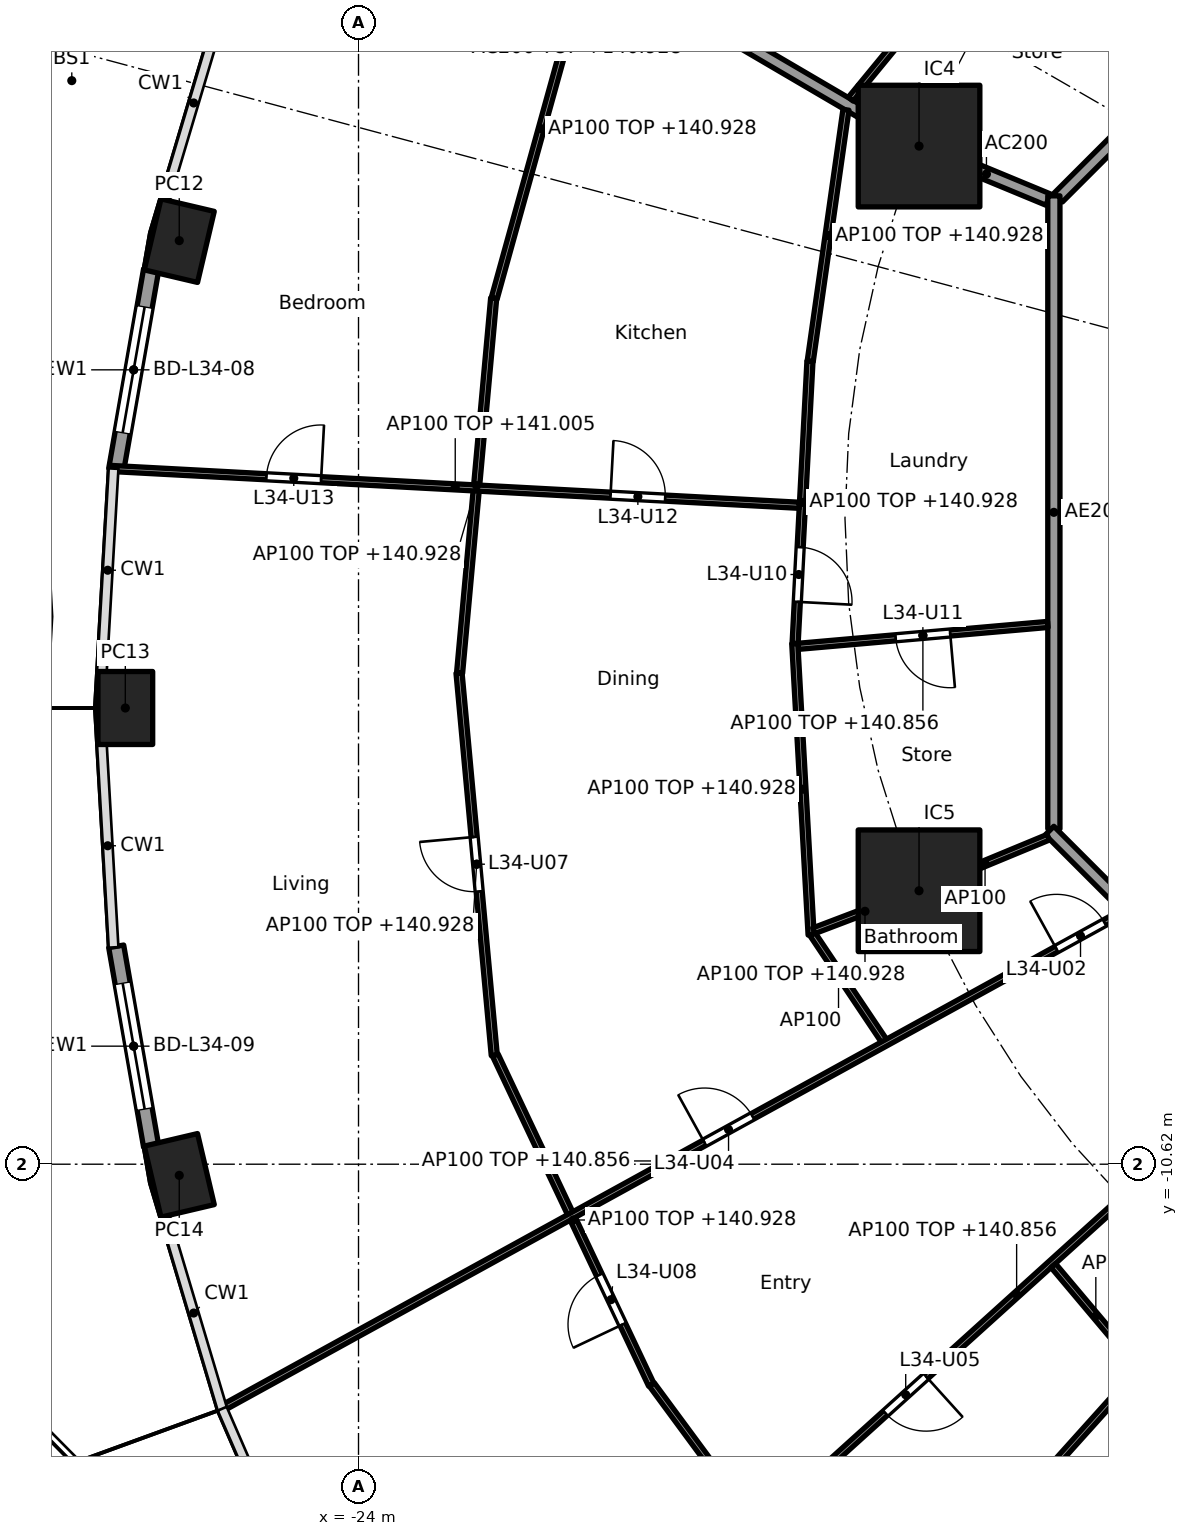
"""IFC4 building model, lengths in metres.
Left out: names, types, materials, properties, quantities, classifications, styles, units other than length and angle.
Written with IfcOpenShell. Run it as: python <this file> out.ifc"""

import sys

from ifc_helpers import new_model, si_unit, direction, frame, frame_2d, origin, origin_2d, place, context, subcontext, project, spatial, rectangle, hollow_rectangle, extrude, element, fill, save


model = new_model("IFC4")
c1 = context("Model", 3, precision=1e-05, world=origin(), true_north=direction((0.0, 1.0)))
c2 = subcontext(c1, "Body", "Model", "MODEL_VIEW")
j1 = project(units=[si_unit("LENGTHUNIT", "METRE"), si_unit("PLANEANGLEUNIT", "RADIAN")], contexts=[c1])
p1 = place(None, origin())
s1 = spatial("IfcSite", under=j1, at=p1, CompositionType="ELEMENT")
p2 = place(p1, origin())
s2 = spatial("IfcBuilding", under=s1, at=p2, CompositionType="ELEMENT")
p3 = place(p2, frame((0.0, 0.0, 138.1)))
s3 = spatial("IfcBuildingStorey", under=s2, at=p3, CompositionType="ELEMENT", Elevation=138.1)
for number, where, z_axis, x_axis in (
    (1, (-26.948, 4.568, 0.0), (0.0, 0.0, 1.0), (-0.229, -0.973, 0.0)),
    (2, (-27.835, -3.118, 0.0), (0.0, 0.0, 1.0), (0.0, -1.0, 0.0)),
    (3, (-26.948, -10.803, 0.0), (0.0, 0.0, 1.0), (0.229, -0.973, 0.0)),
):
    element("IfcColumn", number, at=place(p3, frame(where, z_axis=z_axis, x_axis=x_axis)), inside=s3, PredefinedType="COLUMN", context=c2, shape_type="SweptSolid", body=[
        extrude(hollow_rectangle(XDim=1.2, YDim=0.9, WallThickness=0.04, at=origin_2d()), origin(), (0.0, 0.0, 1.0), 3.7),
    ])
for number, where, z_axis, x_axis in (
    (4, (-14.782, 6.123, 0.0), (0.0, 0.0, 1.0), (1.0, 0.0, 0.0)),
    (5, (-14.782, -6.123, 0.0), (0.0, 0.0, 1.0), (1.0, 0.0, 0.0)),
):
    element("IfcColumn", number, at=place(p3, frame(where, z_axis=z_axis, x_axis=x_axis)), inside=s3, PredefinedType="COLUMN", context=c2, shape_type="SweptSolid", body=[
        extrude(rectangle(XDim=2.0, YDim=2.0, at=origin_2d()), origin(), (0.0, 0.0, 1.0), 3.7),
    ])
p4 = place(p3, frame((-27.985, 0.802, 0.0), z_axis=(0.0, 0.0, 1.0), x_axis=(0.172163521006, 0.985068384446, 0.0)))
e6 = element("IfcWall", 6, at=p4, inside=s3, PredefinedType="SOLIDWALL", context=c2, shape_type="SweptSolid", body=[
    extrude(rectangle(XDim=3.333, YDim=0.25, at=frame_2d((1.666, 0.0))), origin(), (0.0, 0.0, 1.0), 3.44),
])
p5 = place(p4, frame((0.616, 0.0, 0.0)))
e7 = element("IfcOpeningElement", 7, at=p5, cuts=e6, PredefinedType="OPENING", context=c2, shape_type="SweptSolid", body=[
    extrude(rectangle(XDim=2.1, YDim=2.4, at=frame_2d((1.05, 1.2))), frame((0.0, 0.135, 0.0), z_axis=(0.0, -1.0, 0.0), x_axis=(1.0, 0.0, 0.0)), (0.0, 0.0, 1.0), 0.27),
])
p6 = place(p3, frame((-27.411, -10.32, 0.0), z_axis=(0.0, 0.0, 1.0), x_axis=(-0.172163521006, 0.985068384446, 0.0)))
e8 = element("IfcWall", 8, at=p6, inside=s3, PredefinedType="SOLIDWALL", context=c2, shape_type="SweptSolid", body=[
    extrude(rectangle(XDim=3.333, YDim=0.25, at=frame_2d((1.666, 0.0))), origin(), (0.0, 0.0, 1.0), 3.44),
])
p7 = place(p6, frame((0.616, 0.0, 0.0)))
e9 = element("IfcOpeningElement", 9, at=p7, cuts=e8, PredefinedType="OPENING", context=c2, shape_type="SweptSolid", body=[
    extrude(rectangle(XDim=2.1, YDim=2.4, at=frame_2d((1.05, 1.2))), frame((0.0, 0.135, 0.0), z_axis=(0.0, -1.0, 0.0), x_axis=(1.0, 0.0, 0.0)), (0.0, 0.0, 1.0), 0.27),
])
p8 = place(p3, frame((-12.657, 5.243, 0.0), z_axis=(0.0, 0.0, 1.0), x_axis=(-0.923869415315, 0.382707856524, 0.0)))
e10 = element("IfcWall", 10, at=p8, inside=s3, PredefinedType="PARTITIONING", context=c2, shape_type="SweptSolid", body=[
    extrude(rectangle(XDim=2.2, YDim=0.2, at=frame_2d((1.1, 0.0))), origin(), (0.0, 0.0, 1.0), 3.44),
])
p9 = place(p3, frame((-14.825, 6.148, 0.0), z_axis=(0.0, 0.0, 1.0), x_axis=(-0.862852031662, 0.505456597006, 0.0)))
e11 = element("IfcWall", 11, at=p9, inside=s3, PredefinedType="PARTITIONING", context=c2, shape_type="SweptSolid", body=[
    extrude(rectangle(XDim=10.487, YDim=0.2, at=frame_2d((5.244, 0.0))), origin(), (0.0, 0.0, 1.0), 2.828),
])
p10 = place(p3, frame((-6.149, -14.825, 0.0), z_axis=(0.0, 0.0, 1.0), x_axis=(-0.525406383516, -0.85085141603, 0.0)))
e12 = element("IfcWall", 12, at=p10, inside=s3, PredefinedType="PARTITIONING", context=c2, shape_type="SweptSolid", body=[
    extrude(rectangle(XDim=15.925, YDim=0.2, at=frame_2d((7.962, 0.0))), origin(), (0.0, 0.0, 1.0), 2.828),
])
p11 = place(p3, frame((-5.275, 12.494, 0.0), z_axis=(0.0, 0.0, 1.0), x_axis=(-0.707106781187, -0.707106781187, 0.0)))
e13 = element("IfcWall", 13, at=p11, inside=s3, PredefinedType="PARTITIONING", context=c2, shape_type="SweptSolid", body=[
    extrude(rectangle(XDim=10.209, YDim=0.2, at=frame_2d((5.104, 0.0))), origin(), (0.0, 0.0, 1.0), 3.44),
])
p12 = place(p11, frame((4.604, 0.0, 0.0)))
e14 = element("IfcOpeningElement", 14, at=p12, cuts=e13, PredefinedType="OPENING", context=c2, shape_type="SweptSolid", body=[
    extrude(rectangle(XDim=1.0, YDim=2.1, at=frame_2d((0.5, 1.05))), frame((0.0, 0.11, 0.0), z_axis=(0.0, -1.0, 0.0), x_axis=(1.0, 0.0, 0.0)), (0.0, 0.0, 1.0), 0.22),
])
p13 = place(p3, frame((-12.565, 5.304, 0.0), z_axis=(0.0, 0.0, 1.0), x_axis=(0.0, -1.0, 0.0)))
e15 = element("IfcWall", 15, at=p13, inside=s3, PredefinedType="PARTITIONING", context=c2, shape_type="SweptSolid", body=[
    extrude(rectangle(XDim=10.409, YDim=0.2, at=frame_2d((5.205, 0.0))), origin(), (0.0, 0.0, 1.0), 3.44),
])
p14 = place(p3, frame((-12.635, -5.134, 0.0), z_axis=(0.0, 0.0, 1.0), x_axis=(0.707106781187, -0.707106781187, 0.0)))
e16 = element("IfcWall", 16, at=p14, inside=s3, PredefinedType="PARTITIONING", context=c2, shape_type="SweptSolid", body=[
    extrude(rectangle(XDim=10.609, YDim=0.2, at=frame_2d((5.305, 0.0))), origin(), (0.0, 0.0, 1.0), 3.44),
])
p15 = place(p14, frame((3.07, 0.0, 0.0)))
e17 = element("IfcOpeningElement", 17, at=p15, cuts=e16, PredefinedType="OPENING", context=c2, shape_type="SweptSolid", body=[
    extrude(rectangle(XDim=1.0, YDim=2.1, at=frame_2d((0.5, 1.05))), frame((0.0, 0.11, 0.0), z_axis=(0.0, -1.0, 0.0), x_axis=(1.0, 0.0, 0.0)), (0.0, 0.0, 1.0), 0.22),
])
p16 = place(p3, frame((-12.965, 10.475, 0.0), z_axis=(0.0, 0.0, 1.0), x_axis=(-0.634943961338, -0.772558195841, 0.0)))
e18 = element("IfcWall", 18, at=p16, inside=s3, PredefinedType="PARTITIONING", context=c2, shape_type="SweptSolid", body=[
    extrude(rectangle(XDim=4.632, YDim=0.1, at=frame_2d((2.316, 0.0))), origin(), (0.0, 0.0, 1.0), 2.828),
])
p17 = place(p3, frame((-15.984, 6.72, 0.0), z_axis=(0.0, 0.0, 1.0), x_axis=(-0.140684869512, -0.990054426529, 0.0)))
e19 = element("IfcWall", 19, at=p17, inside=s3, PredefinedType="PARTITIONING", context=c2, shape_type="SweptSolid", body=[
    extrude(rectangle(XDim=4.177, YDim=0.1, at=frame_2d((2.088, 0.0))), origin(), (0.0, 0.0, 1.0), 2.828),
])
p18 = place(p3, frame((-20.221, 9.197, 0.0), z_axis=(0.0, 0.0, 1.0), x_axis=(-0.267398009191, -0.963586168789, 0.0)))
e20 = element("IfcWall", 20, at=p18, inside=s3, PredefinedType="PARTITIONING", context=c2, shape_type="SweptSolid", body=[
    extrude(rectangle(XDim=5.788, YDim=0.1, at=frame_2d((2.894, 0.0))), origin(), (0.0, 0.0, 1.0), 2.828),
])
p19 = place(p3, frame((-16.576, 2.585, 0.0), z_axis=(0.0, 0.0, 1.0), x_axis=(-0.052509224895, -0.998620439056, 0.0)))
e21 = element("IfcWall", 21, at=p19, inside=s3, PredefinedType="PARTITIONING", context=c2, shape_type="SweptSolid", body=[
    extrude(rectangle(XDim=4.649, YDim=0.1, at=frame_2d((2.325, 0.0))), origin(), (0.0, 0.0, 1.0), 2.828),
])
p20 = place(p19, frame((3.062, 0.0, 0.0)))
e22 = element("IfcOpeningElement", 22, at=p20, cuts=e21, PredefinedType="OPENING", context=c2, shape_type="SweptSolid", body=[
    extrude(rectangle(XDim=0.9, YDim=2.1, at=frame_2d((0.45, 1.05))), frame((0.0, 0.06, 0.0), z_axis=(0.0, -1.0, 0.0), x_axis=(1.0, 0.0, 0.0)), (0.0, 0.0, 1.0), 0.12),
])
p21 = place(p3, frame((-21.777, 3.621, 0.0), z_axis=(0.0, 0.0, 1.0), x_axis=(-0.090606877484, -0.995886737412, 0.0)))
e23 = element("IfcWall", 23, at=p21, inside=s3, PredefinedType="PARTITIONING", context=c2, shape_type="SweptSolid", body=[
    extrude(rectangle(XDim=6.189, YDim=0.1, at=frame_2d((3.095, 0.0))), origin(), (0.0, 0.0, 1.0), 2.828),
])
p22 = place(p3, frame((-16.75, 0.216, 0.0), z_axis=(0.0, 0.0, 1.0), x_axis=(-0.998572054207, 0.053421461579, 0.0)))
e24 = element("IfcWall", 24, at=p22, inside=s3, PredefinedType="PARTITIONING", context=c2, shape_type="SweptSolid", body=[
    extrude(rectangle(XDim=11.334, YDim=0.1, at=frame_2d((5.667, 0.0))), origin(), (0.0, 0.0, 1.0), 2.905),
])
p23 = place(p22, frame((2.209, 0.0, 0.0)))
e25 = element("IfcOpeningElement", 25, at=p23, cuts=e24, PredefinedType="OPENING", context=c2, shape_type="SweptSolid", body=[
    extrude(rectangle(XDim=0.9, YDim=2.1, at=frame_2d((0.45, 1.05))), frame((0.0, 0.06, 0.0), z_axis=(0.0, -1.0, 0.0), x_axis=(1.0, 0.0, 0.0)), (0.0, 0.0, 1.0), 0.12),
])
p24 = place(p22, frame((7.876, 0.0, 0.0)))
e26 = element("IfcOpeningElement", 26, at=p24, cuts=e24, PredefinedType="OPENING", context=c2, shape_type="SweptSolid", body=[
    extrude(rectangle(XDim=0.9, YDim=2.1, at=frame_2d((0.45, 1.05))), frame((0.0, 0.06, 0.0), z_axis=(0.0, -1.0, 0.0), x_axis=(1.0, 0.0, 0.0)), (0.0, 0.0, 1.0), 0.12),
])
p25 = place(p3, frame((-12.664, -1.744, 0.0), z_axis=(0.0, 0.0, 1.0), x_axis=(-0.996181049379, -0.08731160781, 0.0)))
e27 = element("IfcWall", 27, at=p25, inside=s3, PredefinedType="PARTITIONING", context=c2, shape_type="SweptSolid", body=[
    extrude(rectangle(XDim=4.125, YDim=0.1, at=frame_2d((2.062, 0.0))), origin(), (0.0, 0.0, 1.0), 2.756),
])
p26 = place(p25, frame((1.612, 0.0, 0.0)))
e28 = element("IfcOpeningElement", 28, at=p26, cuts=e27, PredefinedType="OPENING", context=c2, shape_type="SweptSolid", body=[
    extrude(rectangle(XDim=0.9, YDim=2.1, at=frame_2d((0.45, 1.05))), frame((0.0, 0.06, 0.0), z_axis=(0.0, -1.0, 0.0), x_axis=(1.0, 0.0, 0.0)), (0.0, 0.0, 1.0), 0.12),
])
p27 = place(p3, frame((-16.825, -2.058, 0.0), z_axis=(0.0, 0.0, 1.0), x_axis=(0.055971643802, -0.998432358796, 0.0)))
e29 = element("IfcWall", 29, at=p27, inside=s3, PredefinedType="PARTITIONING", context=c2, shape_type="SweptSolid", body=[
    extrude(rectangle(XDim=4.798, YDim=0.1, at=frame_2d((2.399, 0.0))), origin(), (0.0, 0.0, 1.0), 2.828),
])
p28 = place(p3, frame((-22.347, -2.542, 0.0), z_axis=(0.0, 0.0, 1.0), x_axis=(0.091783634244, -0.995778973711, 0.0)))
e30 = element("IfcWall", 30, at=p28, inside=s3, PredefinedType="PARTITIONING", context=c2, shape_type="SweptSolid", body=[
    extrude(rectangle(XDim=6.315, YDim=0.1, at=frame_2d((3.157, 0.0))), origin(), (0.0, 0.0, 1.0), 2.828),
])
p29 = place(p28, frame((2.708, 0.0, 0.0)))
e31 = element("IfcOpeningElement", 31, at=p29, cuts=e30, PredefinedType="OPENING", context=c2, shape_type="SweptSolid", body=[
    extrude(rectangle(XDim=0.9, YDim=2.1, at=frame_2d((0.45, 1.05))), frame((0.0, 0.06, 0.0), z_axis=(0.0, -1.0, 0.0), x_axis=(1.0, 0.0, 0.0)), (0.0, 0.0, 1.0), 0.12),
])
p30 = place(p3, frame((-12.657, -5.243, 0.0), z_axis=(0.0, 0.0, 1.0), x_axis=(-0.923864733477, -0.382719158442, 0.0)))
e32 = element("IfcWall", 32, at=p30, inside=s3, PredefinedType="PARTITIONING", context=c2, shape_type="SweptSolid", body=[
    extrude(rectangle(XDim=2.25, YDim=0.1, at=frame_2d((1.125, 0.0))), origin(), (0.0, 0.0, 1.0), 3.44),
])
p31 = place(p3, frame((-14.829, -6.141, 0.0), z_axis=(0.0, 0.0, 1.0), x_axis=(-0.934704367514, -0.355426146128, 0.0)))
e33 = element("IfcWall", 33, at=p31, inside=s3, PredefinedType="PARTITIONING", context=c2, shape_type="SweptSolid", body=[
    extrude(rectangle(XDim=1.802, YDim=0.1, at=frame_2d((0.901, 0.0))), origin(), (0.0, 0.0, 1.0), 2.828),
])
p32 = place(p3, frame((-16.532, -6.84, 0.0), z_axis=(0.0, 0.0, 1.0), x_axis=(0.556994773624, -0.830515997531, 0.0)))
e34 = element("IfcWall", 34, at=p32, inside=s3, PredefinedType="PARTITIONING", context=c2, shape_type="SweptSolid", body=[
    extrude(rectangle(XDim=2.183, YDim=0.1, at=frame_2d((1.092, 0.0))), origin(), (0.0, 0.0, 1.0), 3.44),
])
p33 = place(p3, frame((-21.75, -8.826, 0.0), z_axis=(0.0, 0.0, 1.0), x_axis=(0.427736419988, -0.903903509793, 0.0)))
e35 = element("IfcWall", 35, at=p33, inside=s3, PredefinedType="PARTITIONING", context=c2, shape_type="SweptSolid", body=[
    extrude(rectangle(XDim=5.999, YDim=0.1, at=frame_2d((3.0, 0.0))), origin(), (0.0, 0.0, 1.0), 2.828),
])
p34 = place(p33, frame((3.999, 0.0, 0.0)))
e36 = element("IfcOpeningElement", 36, at=p34, cuts=e35, PredefinedType="OPENING", context=c2, shape_type="SweptSolid", body=[
    extrude(rectangle(XDim=0.9, YDim=2.1, at=frame_2d((0.45, 1.05))), frame((0.0, 0.06, 0.0), z_axis=(0.0, -1.0, 0.0), x_axis=(1.0, 0.0, 0.0)), (0.0, 0.0, 1.0), 0.12),
])
p35 = place(p3, frame((-11.426, -6.479, 0.0), z_axis=(0.0, 0.0, 1.0), x_axis=(-0.876110392495, -0.482110547657, 0.0)))
e37 = element("IfcWall", 37, at=p35, inside=s3, PredefinedType="PARTITIONING", context=c2, shape_type="SweptSolid", body=[
    extrude(rectangle(XDim=16.955, YDim=0.1, at=frame_2d((8.478, 0.0))), origin(), (0.0, 0.0, 1.0), 2.756),
])
p36 = place(p35, frame((0.35, 0.0, 0.0)))
e38 = element("IfcOpeningElement", 38, at=p36, cuts=e37, PredefinedType="OPENING", context=c2, shape_type="SweptSolid", body=[
    extrude(rectangle(XDim=0.9, YDim=2.1, at=frame_2d((0.45, 1.05))), frame((0.0, 0.06, 0.0), z_axis=(0.0, -1.0, 0.0), x_axis=(1.0, 0.0, 0.0)), (0.0, 0.0, 1.0), 0.12),
])
p37 = place(p35, frame((6.957, 0.0, 0.0)))
e39 = element("IfcOpeningElement", 39, at=p37, cuts=e37, PredefinedType="OPENING", context=c2, shape_type="SweptSolid", body=[
    extrude(rectangle(XDim=0.9, YDim=2.1, at=frame_2d((0.45, 1.05))), frame((0.0, 0.06, 0.0), z_axis=(0.0, -1.0, 0.0), x_axis=(1.0, 0.0, 0.0)), (0.0, 0.0, 1.0), 0.12),
])
p38 = place(p3, frame((-19.176, -14.244, 0.0), z_axis=(0.0, 0.0, 1.0), x_axis=(0.593532053206, -0.80481035146, 0.0)))
e40 = element("IfcWall", 40, at=p38, inside=s3, PredefinedType="PARTITIONING", context=c2, shape_type="SweptSolid", body=[
    extrude(rectangle(XDim=5.876, YDim=0.1, at=frame_2d((2.938, 0.0))), origin(), (0.0, 0.0, 1.0), 2.828),
])
p39 = place(p3, frame((-8.959, -8.952, 0.0), z_axis=(0.0, 0.0, 1.0), x_axis=(-0.741982736283, -0.670418987692, 0.0)))
e41 = element("IfcWall", 41, at=p39, inside=s3, PredefinedType="PARTITIONING", context=c2, shape_type="SweptSolid", body=[
    extrude(rectangle(XDim=11.371, YDim=0.1, at=frame_2d((5.685, 0.0))), origin(), (0.0, 0.0, 1.0), 2.756),
])
p40 = place(p39, frame((2.009, 0.0, 0.0)))
e42 = element("IfcOpeningElement", 42, at=p40, cuts=e41, PredefinedType="OPENING", context=c2, shape_type="SweptSolid", body=[
    extrude(rectangle(XDim=0.9, YDim=2.1, at=frame_2d((0.45, 1.05))), frame((0.0, 0.06, 0.0), z_axis=(0.0, -1.0, 0.0), x_axis=(1.0, 0.0, 0.0)), (0.0, 0.0, 1.0), 0.12),
])
p41 = place(p39, frame((7.694, 0.0, 0.0)))
e43 = element("IfcOpeningElement", 43, at=p41, cuts=e41, PredefinedType="OPENING", context=c2, shape_type="SweptSolid", body=[
    extrude(rectangle(XDim=0.9, YDim=2.1, at=frame_2d((0.45, 1.05))), frame((0.0, 0.06, 0.0), z_axis=(0.0, -1.0, 0.0), x_axis=(1.0, 0.0, 0.0)), (0.0, 0.0, 1.0), 0.12),
])
p42 = place(p3, frame((-12.575, -12.286, 0.0), z_axis=(0.0, 0.0, 1.0), x_axis=(0.644052758448, -0.764981074495, 0.0)))
e44 = element("IfcWall", 44, at=p42, inside=s3, PredefinedType="PARTITIONING", context=c2, shape_type="SweptSolid", body=[
    extrude(rectangle(XDim=2.174, YDim=0.1, at=frame_2d((1.087, 0.0))), origin(), (0.0, 0.0, 1.0), 2.828),
])
p43 = place(p3, frame((-11.109, -13.951, 0.0), z_axis=(0.0, 0.0, 1.0), x_axis=(-0.668488676691, -0.743722319913, 0.0)))
e45 = element("IfcWall", 45, at=p43, inside=s3, PredefinedType="PARTITIONING", context=c2, shape_type="SweptSolid", body=[
    extrude(rectangle(XDim=13.094, YDim=0.1, at=frame_2d((6.547, 0.0))), origin(), (0.0, 0.0, 1.0), 2.828),
])
p44 = place(p43, frame((9.5, 0.0, 0.0)))
e46 = element("IfcOpeningElement", 46, at=p44, cuts=e45, PredefinedType="OPENING", context=c2, shape_type="SweptSolid", body=[
    extrude(rectangle(XDim=0.9, YDim=2.1, at=frame_2d((0.45, 1.05))), frame((0.0, 0.06, 0.0), z_axis=(0.0, -1.0, 0.0), x_axis=(1.0, 0.0, 0.0)), (0.0, 0.0, 1.0), 0.12),
])
p45 = place(p5, origin())
e47 = element("IfcDoor", 47, at=p45, inside=s3, OperationType="SLIDING_TO_LEFT", PredefinedType="DOOR", context=c2, shape_type="SweptSolid", body=[
    extrude(rectangle(XDim=2.1, YDim=2.4, at=frame_2d((1.05, 1.2))), frame((0.0, 0.025, 0.0), z_axis=(0.0, -1.0, 0.0), x_axis=(1.0, 0.0, 0.0)), (0.0, 0.0, 1.0), 0.05),
])
fill(e7, e47)
p46 = place(p7, origin())
e48 = element("IfcDoor", 48, at=p46, inside=s3, OperationType="SLIDING_TO_LEFT", PredefinedType="DOOR", context=c2, shape_type="SweptSolid", body=[
    extrude(rectangle(XDim=2.1, YDim=2.4, at=frame_2d((1.05, 1.2))), frame((0.0, 0.025, 0.0), z_axis=(0.0, -1.0, 0.0), x_axis=(1.0, 0.0, 0.0)), (0.0, 0.0, 1.0), 0.05),
])
fill(e9, e48)
p47 = place(p36, frame((0.9, 0.0, 0.0), x_axis=(-1.0, 0.0, 0.0)))
e49 = element("IfcDoor", 49, at=p47, inside=s3, OperationType="SINGLE_SWING_LEFT", PredefinedType="DOOR", context=c2, shape_type="SweptSolid", body=[
    extrude(rectangle(XDim=0.9, YDim=2.1, at=frame_2d((0.45, 1.05))), frame((0.0, 0.025, 0.0), z_axis=(0.0, -1.0, 0.0), x_axis=(1.0, 0.0, 0.0)), (0.0, 0.0, 1.0), 0.05),
])
fill(e38, e49)
p48 = place(p37, frame((0.9, 0.0, 0.0), x_axis=(-1.0, 0.0, 0.0)))
e50 = element("IfcDoor", 50, at=p48, inside=s3, OperationType="SINGLE_SWING_LEFT", PredefinedType="DOOR", context=c2, shape_type="SweptSolid", body=[
    extrude(rectangle(XDim=0.9, YDim=2.1, at=frame_2d((0.45, 1.05))), frame((0.0, 0.025, 0.0), z_axis=(0.0, -1.0, 0.0), x_axis=(1.0, 0.0, 0.0)), (0.0, 0.0, 1.0), 0.05),
])
fill(e39, e50)
p49 = place(p41, origin())
e51 = element("IfcDoor", 51, at=p49, inside=s3, OperationType="SINGLE_SWING_LEFT", PredefinedType="DOOR", context=c2, shape_type="SweptSolid", body=[
    extrude(rectangle(XDim=0.9, YDim=2.1, at=frame_2d((0.45, 1.05))), frame((0.0, 0.025, 0.0), z_axis=(0.0, -1.0, 0.0), x_axis=(1.0, 0.0, 0.0)), (0.0, 0.0, 1.0), 0.05),
])
fill(e43, e51)
p50 = place(p29, frame((0.9, 0.0, 0.0), x_axis=(-1.0, 0.0, 0.0)))
e52 = element("IfcDoor", 52, at=p50, inside=s3, OperationType="SINGLE_SWING_RIGHT", PredefinedType="DOOR", context=c2, shape_type="SweptSolid", body=[
    extrude(rectangle(XDim=0.9, YDim=2.1, at=frame_2d((0.45, 1.05))), frame((0.0, 0.025, 0.0), z_axis=(0.0, -1.0, 0.0), x_axis=(1.0, 0.0, 0.0)), (0.0, 0.0, 1.0), 0.05),
])
fill(e31, e52)
p51 = place(p34, frame((0.9, 0.0, 0.0), x_axis=(-1.0, 0.0, 0.0)))
e53 = element("IfcDoor", 53, at=p51, inside=s3, OperationType="SINGLE_SWING_LEFT", PredefinedType="DOOR", context=c2, shape_type="SweptSolid", body=[
    extrude(rectangle(XDim=0.9, YDim=2.1, at=frame_2d((0.45, 1.05))), frame((0.0, 0.025, 0.0), z_axis=(0.0, -1.0, 0.0), x_axis=(1.0, 0.0, 0.0)), (0.0, 0.0, 1.0), 0.05),
])
fill(e36, e53)
p52 = place(p20, origin())
e54 = element("IfcDoor", 54, at=p52, inside=s3, OperationType="SINGLE_SWING_RIGHT", PredefinedType="DOOR", context=c2, shape_type="SweptSolid", body=[
    extrude(rectangle(XDim=0.9, YDim=2.1, at=frame_2d((0.45, 1.05))), frame((0.0, 0.025, 0.0), z_axis=(0.0, -1.0, 0.0), x_axis=(1.0, 0.0, 0.0)), (0.0, 0.0, 1.0), 0.05),
])
fill(e22, e54)
p53 = place(p26, origin())
e55 = element("IfcDoor", 55, at=p53, inside=s3, OperationType="SINGLE_SWING_LEFT", PredefinedType="DOOR", context=c2, shape_type="SweptSolid", body=[
    extrude(rectangle(XDim=0.9, YDim=2.1, at=frame_2d((0.45, 1.05))), frame((0.0, 0.025, 0.0), z_axis=(0.0, -1.0, 0.0), x_axis=(1.0, 0.0, 0.0)), (0.0, 0.0, 1.0), 0.05),
])
fill(e28, e55)
p54 = place(p23, frame((0.9, 0.0, 0.0), x_axis=(-1.0, 0.0, 0.0)))
e56 = element("IfcDoor", 56, at=p54, inside=s3, OperationType="SINGLE_SWING_LEFT", PredefinedType="DOOR", context=c2, shape_type="SweptSolid", body=[
    extrude(rectangle(XDim=0.9, YDim=2.1, at=frame_2d((0.45, 1.05))), frame((0.0, 0.025, 0.0), z_axis=(0.0, -1.0, 0.0), x_axis=(1.0, 0.0, 0.0)), (0.0, 0.0, 1.0), 0.05),
])
fill(e25, e56)
p55 = place(p24, frame((0.9, 0.0, 0.0), x_axis=(-1.0, 0.0, 0.0)))
e57 = element("IfcDoor", 57, at=p55, inside=s3, OperationType="SINGLE_SWING_RIGHT", PredefinedType="DOOR", context=c2, shape_type="SweptSolid", body=[
    extrude(rectangle(XDim=0.9, YDim=2.1, at=frame_2d((0.45, 1.05))), frame((0.0, 0.025, 0.0), z_axis=(0.0, -1.0, 0.0), x_axis=(1.0, 0.0, 0.0)), (0.0, 0.0, 1.0), 0.05),
])
fill(e26, e57)
save(model, sys.argv[1])
